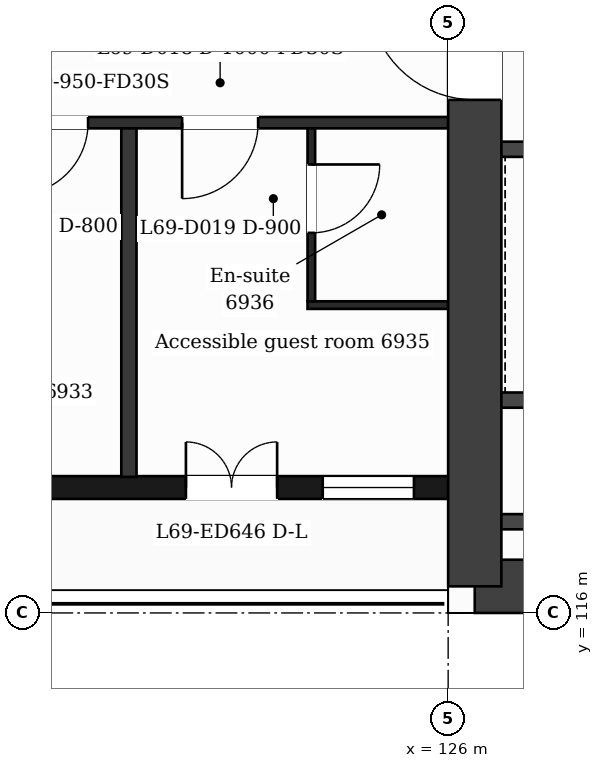
"""IFC4 building model, lengths in metres.
Left out: names, types, materials, properties, quantities, classifications, styles, units other than length and angle.
Written with IfcOpenShell. Run it as: python <this file> out.ifc"""

import sys

from ifc_helpers import new_model, si_unit, direction, frame, frame_2d, origin, place, context, subcontext, project, spatial, rectangle, extrude, element, fill, save


model = new_model("IFC4")
c1 = context("Model", 3, precision=1e-05, world=origin(), true_north=direction((0.0, 1.0)))
c2 = subcontext(c1, "Body", "Model", "MODEL_VIEW")
j1 = project(units=[si_unit("LENGTHUNIT", "METRE"), si_unit("PLANEANGLEUNIT", "RADIAN")], contexts=[c1])
p1 = place(None, origin())
s1 = spatial("IfcSite", under=j1, at=p1, CompositionType="ELEMENT")
p2 = place(p1, origin())
s2 = spatial("IfcBuilding", under=s1, at=p2, CompositionType="ELEMENT")
p3 = place(p2, frame((0.0, 0.0, 284.9)))
s3 = spatial("IfcBuildingStorey", under=s2, at=p3, CompositionType="ELEMENT", Elevation=284.9)
p4 = place(p3, frame((139.977, 116.35, 0.0), z_axis=(0.0, 0.0, 1.0), x_axis=(-1.0, 0.0, 0.0)))
e1 = element("IfcWall", 1, at=p4, inside=s3, PredefinedType="SHEAR", context=c2, shape_type="SweptSolid", body=[
    extrude(rectangle(XDim=13.626, YDim=0.7, at=frame_2d((6.813, 0.0))), origin(), (0.0, 0.0, 1.0), 3.7),
])
p5 = place(p3, frame((126.35, 116.35, 0.0), z_axis=(0.0, 0.0, 1.0), x_axis=(0.0, 1.0, 0.0)))
e2 = element("IfcWall", 2, at=p5, inside=s3, PredefinedType="SHEAR", context=c2, shape_type="SweptSolid", body=[
    extrude(rectangle(XDim=15.7, YDim=0.7, at=frame_2d((7.85, 0.0))), origin(), (0.0, 0.0, 1.0), 3.7),
])
p6 = place(p5, frame((6.4, 0.0, 0.0)))
e3 = element("IfcOpeningElement", 3, at=p6, cuts=e2, PredefinedType="OPENING", context=c2, shape_type="SweptSolid", body=[
    extrude(rectangle(XDim=1.4, YDim=2.1, at=frame_2d((0.7, 1.05))), frame((0.0, 0.36, 0.0), z_axis=(0.0, -1.0, 0.0), x_axis=(1.0, 0.0, 0.0)), (0.0, 0.0, 1.0), 0.72),
])
p7 = place(p3, frame((100.8, 117.65, 0.0), z_axis=(0.0, 0.0, 1.0), x_axis=(1.0, 0.0, 0.0)))
e4 = element("IfcWall", 4, at=p7, inside=s3, PredefinedType="SOLIDWALL", context=c2, shape_type="SweptSolid", body=[
    extrude(rectangle(XDim=25.2, YDim=0.3, at=frame_2d((12.6, 0.0))), origin(), (0.0, 0.0, 1.0), 3.38),
])
p8 = place(p7, frame((0.95, 0.0, 0.9)))
e5 = element("IfcOpeningElement", 5, at=p8, cuts=e4, PredefinedType="OPENING", context=c2, shape_type="SweptSolid", body=[
    extrude(rectangle(XDim=2.4, YDim=2.1, at=frame_2d((1.2, 1.05))), frame((0.0, 0.16, 0.0), z_axis=(0.0, -1.0, 0.0), x_axis=(1.0, 0.0, 0.0)), (0.0, 0.0, 1.0), 0.32),
])
p9 = place(p7, frame((5.1, 0.0, 0.9)))
e6 = element("IfcOpeningElement", 6, at=p9, cuts=e4, PredefinedType="OPENING", context=c2, shape_type="SweptSolid", body=[
    extrude(rectangle(XDim=2.4, YDim=2.1, at=frame_2d((1.2, 1.05))), frame((0.0, 0.16, 0.0), z_axis=(0.0, -1.0, 0.0), x_axis=(1.0, 0.0, 0.0)), (0.0, 0.0, 1.0), 0.32),
])
p10 = place(p7, frame((9.3, 0.0, 0.9)))
e7 = element("IfcOpeningElement", 7, at=p10, cuts=e4, PredefinedType="OPENING", context=c2, shape_type="SweptSolid", body=[
    extrude(rectangle(XDim=2.4, YDim=2.1, at=frame_2d((1.2, 1.05))), frame((0.0, 0.16, 0.0), z_axis=(0.0, -1.0, 0.0), x_axis=(1.0, 0.0, 0.0)), (0.0, 0.0, 1.0), 0.32),
])
p11 = place(p7, frame((14.1, 0.0, 0.9)))
e8 = element("IfcOpeningElement", 8, at=p11, cuts=e4, PredefinedType="OPENING", context=c2, shape_type="SweptSolid", body=[
    extrude(rectangle(XDim=1.2, YDim=2.1, at=frame_2d((0.6, 1.05))), frame((0.0, 0.16, 0.0), z_axis=(0.0, -1.0, 0.0), x_axis=(1.0, 0.0, 0.0)), (0.0, 0.0, 1.0), 0.32),
])
p12 = place(p7, frame((18.3, 0.0, 0.9)))
e9 = element("IfcOpeningElement", 9, at=p12, cuts=e4, PredefinedType="OPENING", context=c2, shape_type="SweptSolid", body=[
    extrude(rectangle(XDim=1.2, YDim=2.1, at=frame_2d((0.6, 1.05))), frame((0.0, 0.16, 0.0), z_axis=(0.0, -1.0, 0.0), x_axis=(1.0, 0.0, 0.0)), (0.0, 0.0, 1.0), 0.32),
])
p13 = place(p7, frame((21.75, 0.0, 0.0)))
e10 = element("IfcOpeningElement", 10, at=p13, cuts=e4, PredefinedType="OPENING", context=c2, shape_type="SweptSolid", body=[
    extrude(rectangle(XDim=1.2, YDim=2.4, at=frame_2d((0.6, 1.2))), frame((0.0, 0.16, 0.0), z_axis=(0.0, -1.0, 0.0), x_axis=(1.0, 0.0, 0.0)), (0.0, 0.0, 1.0), 0.32),
])
p14 = place(p7, frame((23.55, 0.0, 0.9)))
e11 = element("IfcOpeningElement", 11, at=p14, cuts=e4, PredefinedType="OPENING", context=c2, shape_type="SweptSolid", body=[
    extrude(rectangle(XDim=1.2, YDim=2.1, at=frame_2d((0.6, 1.05))), frame((0.0, 0.16, 0.0), z_axis=(0.0, -1.0, 0.0), x_axis=(1.0, 0.0, 0.0)), (0.0, 0.0, 1.0), 0.32),
])
for number, where, z_axis, x_axis in (
    (12, (126.7, 117.2, 0.0), (0.0, 0.0, 1.0), (1.0, 0.0, 0.0)),
    (13, (126.7, 118.8, 0.0), (0.0, 0.0, 1.0), (1.0, 0.0, 0.0)),
):
    element("IfcWall", number, at=place(p3, frame(where, z_axis=z_axis, x_axis=x_axis)), inside=s3, PredefinedType="PARTITIONING", context=c2, shape_type="SweptSolid", body=[
        extrude(rectangle(XDim=4.873, YDim=0.2, at=frame_2d((2.437, 0.0))), origin(), (0.0, 0.0, 1.0), 3.38),
    ])
p15 = place(p3, frame((124.15, 120.05, 0.0), z_axis=(0.0, 0.0, 1.0), x_axis=(1.0, 0.0, 0.0)))
e14 = element("IfcWall", 14, at=p15, inside=s3, PredefinedType="PARTITIONING", context=c2, shape_type="SweptSolid", body=[
    extrude(rectangle(XDim=1.85, YDim=0.1, at=frame_2d((0.925, 0.0))), origin(), (0.0, 0.0, 1.0), 3.38),
])
p16 = place(p3, frame((126.7, 122.1, 0.0), z_axis=(0.0, 0.0, 1.0), x_axis=(1.0, 0.0, 0.0)))
e15 = element("IfcWall", 15, at=p16, inside=s3, PredefinedType="PARTITIONING", context=c2, shape_type="SweptSolid", body=[
    extrude(rectangle(XDim=4.873, YDim=0.2, at=frame_2d((2.437, 0.0))), origin(), (0.0, 0.0, 1.0), 3.38),
])
p17 = place(p16, frame((3.105, 0.0, 0.0)))
e16 = element("IfcOpeningElement", 16, at=p17, cuts=e15, PredefinedType="OPENING", context=c2, shape_type="SweptSolid", body=[
    extrude(rectangle(XDim=1.1, YDim=2.1, at=frame_2d((0.55, 1.05))), frame((0.0, 0.11, 0.0), z_axis=(0.0, -1.0, 0.0), x_axis=(1.0, 0.0, 0.0)), (0.0, 0.0, 1.0), 0.22),
])
p18 = place(p16, frame((0.732, 0.0, 0.0)))
e17 = element("IfcOpeningElement", 17, at=p18, cuts=e15, PredefinedType="OPENING", context=c2, shape_type="SweptSolid", body=[
    extrude(rectangle(XDim=1.1, YDim=2.1, at=frame_2d((0.55, 1.05))), frame((0.0, 0.11, 0.0), z_axis=(0.0, -1.0, 0.0), x_axis=(1.0, 0.0, 0.0)), (0.0, 0.0, 1.0), 0.22),
])
p19 = place(p3, frame((100.8, 122.45, 0.0), z_axis=(0.0, 0.0, 1.0), x_axis=(1.0, 0.0, 0.0)))
e18 = element("IfcWall", 18, at=p19, inside=s3, PredefinedType="PARTITIONING", context=c2, shape_type="SweptSolid", body=[
    extrude(rectangle(XDim=25.2, YDim=0.15, at=frame_2d((12.6, 0.0))), origin(), (0.0, 0.0, 1.0), 3.38),
])
p20 = place(p19, frame((0.55, 0.0, 0.0)))
e19 = element("IfcOpeningElement", 19, at=p20, cuts=e18, PredefinedType="OPENING", context=c2, shape_type="SweptSolid", body=[
    extrude(rectangle(XDim=1.0, YDim=2.1, at=frame_2d((0.5, 1.05))), frame((0.0, 0.085, 0.0), z_axis=(0.0, -1.0, 0.0), x_axis=(1.0, 0.0, 0.0)), (0.0, 0.0, 1.0), 0.17),
])
p21 = place(p19, frame((9.375, 0.0, 0.0)))
e20 = element("IfcOpeningElement", 20, at=p21, cuts=e18, PredefinedType="OPENING", context=c2, shape_type="SweptSolid", body=[
    extrude(rectangle(XDim=1.0, YDim=2.1, at=frame_2d((0.5, 1.05))), frame((0.0, 0.085, 0.0), z_axis=(0.0, -1.0, 0.0), x_axis=(1.0, 0.0, 0.0)), (0.0, 0.0, 1.0), 0.17),
])
p22 = place(p19, frame((13.23, 0.0, 0.0)))
e21 = element("IfcOpeningElement", 21, at=p22, cuts=e18, PredefinedType="OPENING", context=c2, shape_type="SweptSolid", body=[
    extrude(rectangle(XDim=1.0, YDim=2.1, at=frame_2d((0.5, 1.05))), frame((0.0, 0.085, 0.0), z_axis=(0.0, -1.0, 0.0), x_axis=(1.0, 0.0, 0.0)), (0.0, 0.0, 1.0), 0.17),
])
p23 = place(p19, frame((19.513, 0.0, 0.0)))
e22 = element("IfcOpeningElement", 22, at=p23, cuts=e18, PredefinedType="OPENING", context=c2, shape_type="SweptSolid", body=[
    extrude(rectangle(XDim=0.95, YDim=2.1, at=frame_2d((0.475, 1.05))), frame((0.0, 0.085, 0.0), z_axis=(0.0, -1.0, 0.0), x_axis=(1.0, 0.0, 0.0)), (0.0, 0.0, 1.0), 0.17),
])
p24 = place(p19, frame((21.7, 0.0, 0.0)))
e23 = element("IfcOpeningElement", 23, at=p24, cuts=e18, PredefinedType="OPENING", context=c2, shape_type="SweptSolid", body=[
    extrude(rectangle(XDim=1.0, YDim=2.1, at=frame_2d((0.5, 1.05))), frame((0.0, 0.085, 0.0), z_axis=(0.0, -1.0, 0.0), x_axis=(1.0, 0.0, 0.0)), (0.0, 0.0, 1.0), 0.17),
])
p25 = place(p3, frame((121.8, 117.79, 0.0), z_axis=(0.0, 0.0, 1.0), x_axis=(0.0, 1.0, 0.0)))
e24 = element("IfcWall", 24, at=p25, inside=s3, PredefinedType="PARTITIONING", context=c2, shape_type="SweptSolid", body=[
    extrude(rectangle(XDim=4.585, YDim=0.2, at=frame_2d((2.292, 0.0))), origin(), (0.0, 0.0, 1.0), 3.38),
])
p26 = place(p3, frame((124.2, 120.1, 0.0), z_axis=(0.0, 0.0, 1.0), x_axis=(0.0, 1.0, 0.0)))
e25 = element("IfcWall", 25, at=p26, inside=s3, PredefinedType="PARTITIONING", context=c2, shape_type="SweptSolid", body=[
    extrude(rectangle(XDim=2.275, YDim=0.1, at=frame_2d((1.137, 0.0))), origin(), (0.0, 0.0, 1.0), 3.38),
])
p27 = place(p26, frame((0.9, 0.0, 0.0)))
e26 = element("IfcOpeningElement", 26, at=p27, cuts=e25, PredefinedType="OPENING", context=c2, shape_type="SweptSolid", body=[
    extrude(rectangle(XDim=0.9, YDim=2.1, at=frame_2d((0.45, 1.05))), frame((0.0, 0.06, 0.0), z_axis=(0.0, -1.0, 0.0), x_axis=(1.0, 0.0, 0.0)), (0.0, 0.0, 1.0), 0.12),
])
p28 = place(p13, origin())
e27 = element("IfcDoor", 27, at=p28, inside=s3, OperationType="DOUBLE_DOOR_SINGLE_SWING", PredefinedType="DOOR", context=c2, shape_type="SweptSolid", body=[
    extrude(rectangle(XDim=1.2, YDim=2.4, at=frame_2d((0.6, 1.2))), frame((0.0, 0.025, 0.0), z_axis=(0.0, -1.0, 0.0), x_axis=(1.0, 0.0, 0.0)), (0.0, 0.0, 1.0), 0.05),
])
fill(e10, e27)
p29 = place(p14, origin())
e28 = element("IfcWindow", 28, at=p29, inside=s3, PartitioningType="SINGLE_PANEL", PredefinedType="WINDOW", context=c2, shape_type="SweptSolid", body=[
    extrude(rectangle(XDim=1.2, YDim=2.1, at=frame_2d((0.6, 1.05))), frame((0.0, 0.03, 0.0), z_axis=(0.0, -1.0, 0.0), x_axis=(1.0, 0.0, 0.0)), (0.0, 0.0, 1.0), 0.06),
])
fill(e11, e28)
p30 = place(p23, origin())
e29 = element("IfcDoor", 29, at=p30, inside=s3, OperationType="SINGLE_SWING_LEFT", PredefinedType="DOOR", context=c2, shape_type="SweptSolid", body=[
    extrude(rectangle(XDim=0.95, YDim=2.1, at=frame_2d((0.475, 1.05))), frame((0.0, 0.025, 0.0), z_axis=(0.0, -1.0, 0.0), x_axis=(1.0, 0.0, 0.0)), (0.0, 0.0, 1.0), 0.05),
])
fill(e22, e29)
p31 = place(p24, origin())
e30 = element("IfcDoor", 30, at=p31, inside=s3, OperationType="SINGLE_SWING_LEFT", PredefinedType="DOOR", context=c2, shape_type="SweptSolid", body=[
    extrude(rectangle(XDim=1.0, YDim=2.1, at=frame_2d((0.5, 1.05))), frame((0.0, 0.025, 0.0), z_axis=(0.0, -1.0, 0.0), x_axis=(1.0, 0.0, 0.0)), (0.0, 0.0, 1.0), 0.05),
])
fill(e23, e30)
p32 = place(p27, origin())
e31 = element("IfcDoor", 31, at=p32, inside=s3, OperationType="SINGLE_SWING_RIGHT", PredefinedType="DOOR", context=c2, shape_type="SweptSolid", body=[
    extrude(rectangle(XDim=0.9, YDim=2.1, at=frame_2d((0.45, 1.05))), frame((0.0, 0.025, 0.0), z_axis=(0.0, -1.0, 0.0), x_axis=(1.0, 0.0, 0.0)), (0.0, 0.0, 1.0), 0.05),
])
fill(e26, e31)
p33 = place(p6, origin())
e32 = element("IfcDoor", 32, at=p33, inside=s3, OperationType="SINGLE_SWING_RIGHT", PredefinedType="DOOR", context=c2, shape_type="SweptSolid", body=[
    extrude(rectangle(XDim=1.4, YDim=2.1, at=frame_2d((0.7, 1.05))), frame((0.0, 0.025, 0.0), z_axis=(0.0, -1.0, 0.0), x_axis=(1.0, 0.0, 0.0)), (0.0, 0.0, 1.0), 0.05),
])
fill(e3, e32)
save(model, sys.argv[1])
